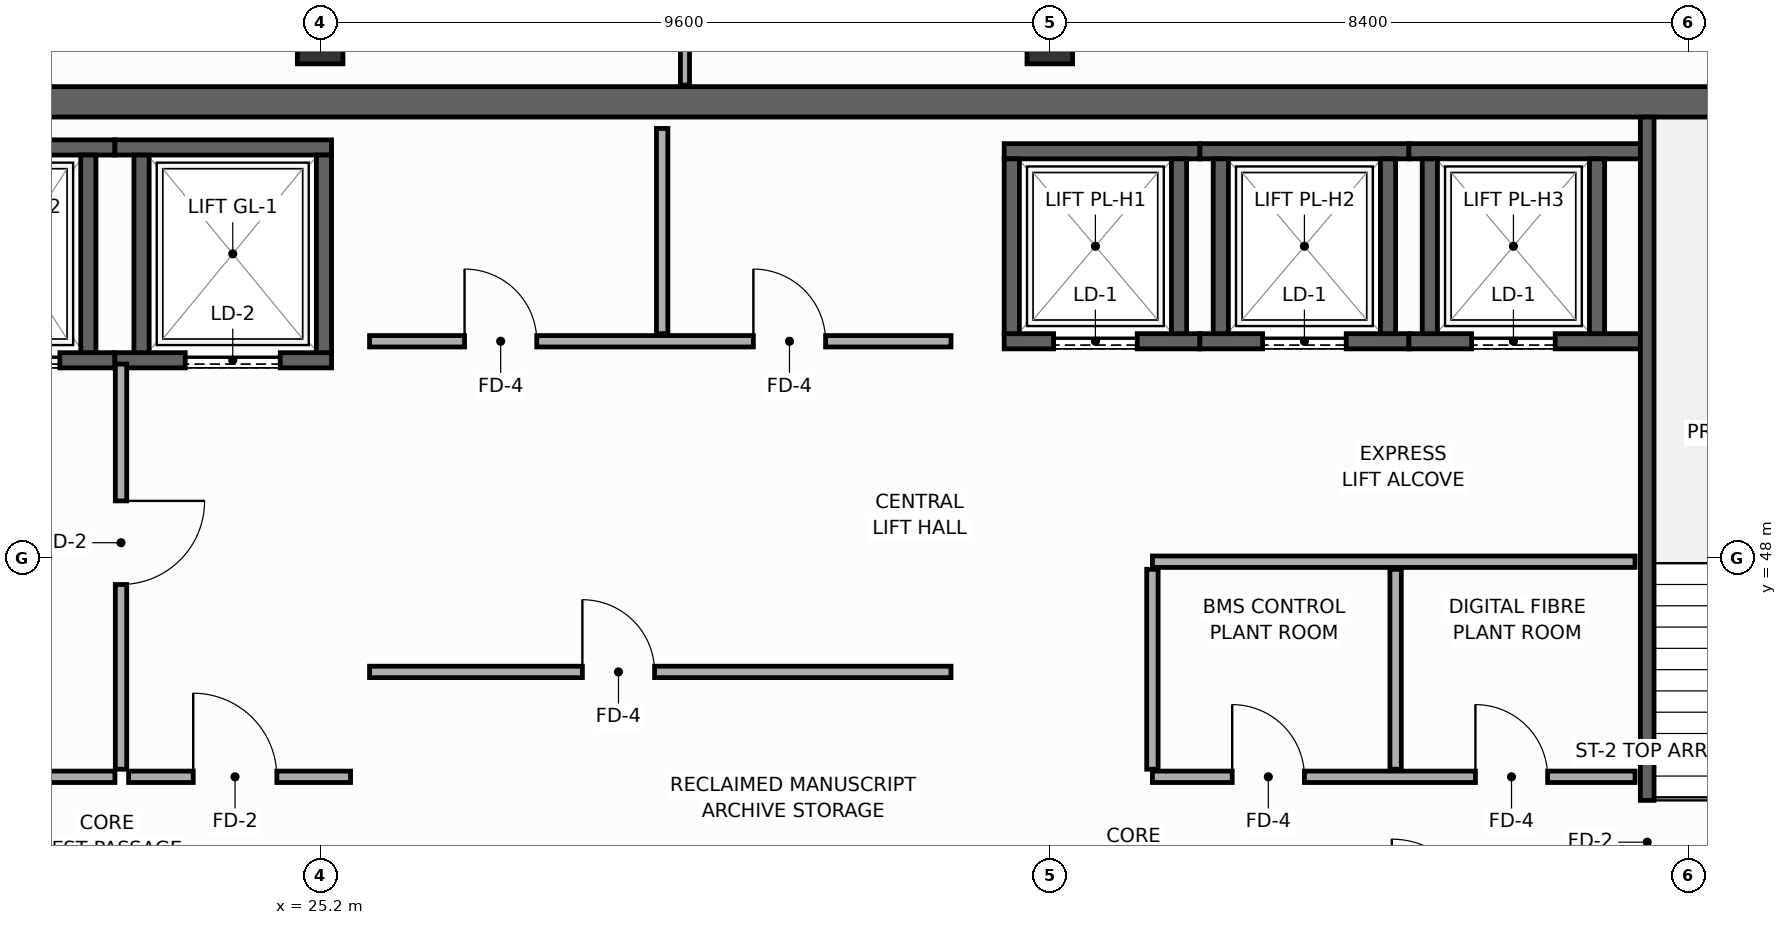
"""IFC4 building model, lengths in metres.
Left out: names, types, materials, properties, quantities, classifications, styles, units other than length and angle.
Written with IfcOpenShell. Run it as: python <this file> out.ifc"""

import sys

from ifc_helpers import new_model, si_unit, direction, frame, frame_2d, origin, origin_2d, place, context, subcontext, project, spatial, rectangle, hollow_rectangle, extrude, element, fill, save


model = new_model("IFC4")
c1 = context("Model", 3, precision=1e-05, world=origin(), true_north=direction((0.0, 1.0)))
c2 = subcontext(c1, "Body", "Model", "MODEL_VIEW")
j1 = project(units=[si_unit("LENGTHUNIT", "METRE"), si_unit("PLANEANGLEUNIT", "RADIAN")], contexts=[c1])
p1 = place(None, origin())
s1 = spatial("IfcSite", under=j1, at=p1, CompositionType="ELEMENT")
p2 = place(p1, origin())
s2 = spatial("IfcBuilding", under=s1, at=p2, CompositionType="ELEMENT")
p3 = place(p2, frame((0.0, 0.0, 323.4)))
s3 = spatial("IfcBuildingStorey", under=s2, at=p3, CompositionType="ELEMENT", Elevation=323.4)
p4 = place(p3, frame((13.7, 54.0, 0.0), z_axis=(0.0, 0.0, 1.0), x_axis=(1.0, 0.0, 0.0)))
e1 = element("IfcWall", 1, at=p4, inside=s3, PredefinedType="SHEAR", context=c2, shape_type="SweptSolid", body=[
    extrude(rectangle(XDim=32.5, YDim=0.4, at=frame_2d((16.25, 0.0))), origin(), (0.0, 0.0, 1.0), 3.9),
])
for number, where, z_axis, x_axis in (
    (2, (25.2, 54.8, 0.0), (0.0, 0.0, 1.0), (1.0, 0.0, 0.0)),
    (3, (34.8, 54.8, 0.0), (0.0, 0.0, 1.0), (1.0, 0.0, 0.0)),
):
    element("IfcColumn", number, at=place(p3, frame(where, z_axis=z_axis, x_axis=x_axis)), inside=s3, PredefinedType="COLUMN", context=c2, shape_type="SweptSolid", body=[
        extrude(hollow_rectangle(XDim=0.6, YDim=0.6, WallThickness=0.028, at=origin_2d()), origin(), (0.0, 0.0, 1.0), 4.2),
    ])
p5 = place(p3, frame((19.85, 50.6, 0.0), z_axis=(0.0, 0.0, 1.0), x_axis=(1.0, 0.0, 0.0)))
e4 = element("IfcWall", 4, at=p5, inside=s3, PredefinedType="SHEAR", context=c2, shape_type="SweptSolid", body=[
    extrude(rectangle(XDim=2.65, YDim=0.2, at=frame_2d((1.325, 0.0))), origin(), (0.0, 0.0, 1.0), 3.68),
])
p6 = place(p5, frame((0.675, 0.0, 0.0)))
e5 = element("IfcOpeningElement", 5, at=p6, cuts=e4, PredefinedType="OPENING", context=c2, shape_type="SweptSolid", body=[
    extrude(rectangle(XDim=1.25, YDim=2.3, at=frame_2d((0.625, 1.15))), frame((0.0, 0.11, 0.0), z_axis=(0.0, -1.0, 0.0), x_axis=(1.0, 0.0, 0.0)), (0.0, 0.0, 1.0), 0.22),
])
p7 = place(p3, frame((19.85, 53.4, 0.0), z_axis=(0.0, 0.0, 1.0), x_axis=(1.0, 0.0, 0.0)))
e6 = element("IfcWall", 6, at=p7, inside=s3, PredefinedType="SHEAR", context=c2, shape_type="SweptSolid", body=[
    extrude(rectangle(XDim=2.65, YDim=0.2, at=frame_2d((1.325, 0.0))), origin(), (0.0, 0.0, 1.0), 3.68),
])
p8 = place(p3, frame((22.15, 50.7, 0.0), z_axis=(0.0, 0.0, 1.0), x_axis=(0.0, 1.0, 0.0)))
e7 = element("IfcWall", 7, at=p8, inside=s3, PredefinedType="SHEAR", context=c2, shape_type="SweptSolid", body=[
    extrude(rectangle(XDim=2.6, YDim=0.2, at=frame_2d((1.3, 0.0))), origin(), (0.0, 0.0, 1.0), 3.68),
])
p9 = place(p3, frame((22.5, 50.6, 0.0), z_axis=(0.0, 0.0, 1.0), x_axis=(1.0, 0.0, 0.0)))
e8 = element("IfcWall", 8, at=p9, inside=s3, PredefinedType="SHEAR", context=c2, shape_type="SweptSolid", body=[
    extrude(rectangle(XDim=2.85, YDim=0.2, at=frame_2d((1.425, 0.0))), origin(), (0.0, 0.0, 1.0), 3.68),
])
p10 = place(p9, frame((0.925, 0.0, 0.0)))
e9 = element("IfcOpeningElement", 9, at=p10, cuts=e8, PredefinedType="OPENING", context=c2, shape_type="SweptSolid", body=[
    extrude(rectangle(XDim=1.25, YDim=2.3, at=frame_2d((0.625, 1.15))), frame((0.0, 0.11, 0.0), z_axis=(0.0, -1.0, 0.0), x_axis=(1.0, 0.0, 0.0)), (0.0, 0.0, 1.0), 0.22),
])
p11 = place(p3, frame((22.5, 53.4, 0.0), z_axis=(0.0, 0.0, 1.0), x_axis=(1.0, 0.0, 0.0)))
e10 = element("IfcWall", 10, at=p11, inside=s3, PredefinedType="SHEAR", context=c2, shape_type="SweptSolid", body=[
    extrude(rectangle(XDim=2.85, YDim=0.2, at=frame_2d((1.425, 0.0))), origin(), (0.0, 0.0, 1.0), 3.68),
])
for number, where, z_axis, x_axis in (
    (11, (22.85, 50.7, 0.0), (0.0, 0.0, 1.0), (0.0, 1.0, 0.0)),
    (12, (25.25, 50.7, 0.0), (0.0, 0.0, 1.0), (0.0, 1.0, 0.0)),
):
    element("IfcWall", number, at=place(p3, frame(where, z_axis=z_axis, x_axis=x_axis)), inside=s3, PredefinedType="SHEAR", context=c2, shape_type="SweptSolid", body=[
        extrude(rectangle(XDim=2.6, YDim=0.2, at=frame_2d((1.3, 0.0))), origin(), (0.0, 0.0, 1.0), 3.68),
    ])
p12 = place(p3, frame((34.2, 50.85, 0.0), z_axis=(0.0, 0.0, 1.0), x_axis=(1.0, 0.0, 0.0)))
e13 = element("IfcWall", 13, at=p12, inside=s3, PredefinedType="SHEAR", context=c2, shape_type="SweptSolid", body=[
    extrude(rectangle(XDim=2.575, YDim=0.2, at=frame_2d((1.288, 0.0))), origin(), (0.0, 0.0, 1.0), 3.68),
])
p13 = place(p12, frame((0.65, 0.0, 0.0)))
e14 = element("IfcOpeningElement", 14, at=p13, cuts=e13, PredefinedType="OPENING", context=c2, shape_type="SweptSolid", body=[
    extrude(rectangle(XDim=1.1, YDim=2.2, at=frame_2d((0.55, 1.1))), frame((0.0, 0.11, 0.0), z_axis=(0.0, -1.0, 0.0), x_axis=(1.0, 0.0, 0.0)), (0.0, 0.0, 1.0), 0.22),
])
p14 = place(p3, frame((34.2, 53.35, 0.0), z_axis=(0.0, 0.0, 1.0), x_axis=(1.0, 0.0, 0.0)))
e15 = element("IfcWall", 15, at=p14, inside=s3, PredefinedType="SHEAR", context=c2, shape_type="SweptSolid", body=[
    extrude(rectangle(XDim=2.575, YDim=0.2, at=frame_2d((1.288, 0.0))), origin(), (0.0, 0.0, 1.0), 3.68),
])
for number, where, z_axis, x_axis in (
    (16, (34.3, 50.95, 0.0), (0.0, 0.0, 1.0), (0.0, 1.0, 0.0)),
    (17, (36.5, 50.95, 0.0), (0.0, 0.0, 1.0), (0.0, 1.0, 0.0)),
):
    element("IfcWall", number, at=place(p3, frame(where, z_axis=z_axis, x_axis=x_axis)), inside=s3, PredefinedType="SHEAR", context=c2, shape_type="SweptSolid", body=[
        extrude(rectangle(XDim=2.3, YDim=0.2, at=frame_2d((1.15, 0.0))), origin(), (0.0, 0.0, 1.0), 3.68),
    ])
p15 = place(p3, frame((36.775, 50.85, 0.0), z_axis=(0.0, 0.0, 1.0), x_axis=(1.0, 0.0, 0.0)))
e18 = element("IfcWall", 18, at=p15, inside=s3, PredefinedType="SHEAR", context=c2, shape_type="SweptSolid", body=[
    extrude(rectangle(XDim=2.75, YDim=0.2, at=frame_2d((1.375, 0.0))), origin(), (0.0, 0.0, 1.0), 3.68),
])
p16 = place(p15, frame((0.825, 0.0, 0.0)))
e19 = element("IfcOpeningElement", 19, at=p16, cuts=e18, PredefinedType="OPENING", context=c2, shape_type="SweptSolid", body=[
    extrude(rectangle(XDim=1.1, YDim=2.2, at=frame_2d((0.55, 1.1))), frame((0.0, 0.11, 0.0), z_axis=(0.0, -1.0, 0.0), x_axis=(1.0, 0.0, 0.0)), (0.0, 0.0, 1.0), 0.22),
])
p17 = place(p3, frame((36.775, 53.35, 0.0), z_axis=(0.0, 0.0, 1.0), x_axis=(1.0, 0.0, 0.0)))
e20 = element("IfcWall", 20, at=p17, inside=s3, PredefinedType="SHEAR", context=c2, shape_type="SweptSolid", body=[
    extrude(rectangle(XDim=2.75, YDim=0.2, at=frame_2d((1.375, 0.0))), origin(), (0.0, 0.0, 1.0), 3.68),
])
for number, where, z_axis, x_axis in (
    (21, (37.05, 50.95, 0.0), (0.0, 0.0, 1.0), (0.0, 1.0, 0.0)),
    (22, (39.25, 50.95, 0.0), (0.0, 0.0, 1.0), (0.0, 1.0, 0.0)),
):
    element("IfcWall", number, at=place(p3, frame(where, z_axis=z_axis, x_axis=x_axis)), inside=s3, PredefinedType="SHEAR", context=c2, shape_type="SweptSolid", body=[
        extrude(rectangle(XDim=2.3, YDim=0.2, at=frame_2d((1.15, 0.0))), origin(), (0.0, 0.0, 1.0), 3.68),
    ])
p18 = place(p3, frame((39.525, 50.85, 0.0), z_axis=(0.0, 0.0, 1.0), x_axis=(1.0, 0.0, 0.0)))
e23 = element("IfcWall", 23, at=p18, inside=s3, PredefinedType="SHEAR", context=c2, shape_type="SweptSolid", body=[
    extrude(rectangle(XDim=3.045, YDim=0.2, at=frame_2d((1.522, 0.0))), origin(), (0.0, 0.0, 1.0), 3.68),
])
p19 = place(p18, frame((0.825, 0.0, 0.0)))
e24 = element("IfcOpeningElement", 24, at=p19, cuts=e23, PredefinedType="OPENING", context=c2, shape_type="SweptSolid", body=[
    extrude(rectangle(XDim=1.1, YDim=2.2, at=frame_2d((0.55, 1.1))), frame((0.0, 0.11, 0.0), z_axis=(0.0, -1.0, 0.0), x_axis=(1.0, 0.0, 0.0)), (0.0, 0.0, 1.0), 0.22),
])
p20 = place(p3, frame((39.525, 53.35, 0.0), z_axis=(0.0, 0.0, 1.0), x_axis=(1.0, 0.0, 0.0)))
e25 = element("IfcWall", 25, at=p20, inside=s3, PredefinedType="SHEAR", context=c2, shape_type="SweptSolid", body=[
    extrude(rectangle(XDim=3.045, YDim=0.2, at=frame_2d((1.522, 0.0))), origin(), (0.0, 0.0, 1.0), 3.68),
])
for number, where, z_axis, x_axis in (
    (26, (39.8, 50.95, 0.0), (0.0, 0.0, 1.0), (0.0, 1.0, 0.0)),
    (27, (42.0, 50.95, 0.0), (0.0, 0.0, 1.0), (0.0, 1.0, 0.0)),
):
    element("IfcWall", number, at=place(p3, frame(where, z_axis=z_axis, x_axis=x_axis)), inside=s3, PredefinedType="SHEAR", context=c2, shape_type="SweptSolid", body=[
        extrude(rectangle(XDim=2.3, YDim=0.2, at=frame_2d((1.15, 0.0))), origin(), (0.0, 0.0, 1.0), 3.68),
    ])
p21 = place(p3, frame((42.66, 53.8, 0.0), z_axis=(0.0, 0.0, 1.0), x_axis=(0.0, -1.0, 0.0)))
e28 = element("IfcWall", 28, at=p21, inside=s3, PredefinedType="SHEAR", context=c2, shape_type="SweptSolid", body=[
    extrude(rectangle(XDim=10.4, YDim=0.18, at=frame_2d((5.2, 0.0))), origin(), (0.0, 0.0, 1.0), 3.9),
])
p22 = place(p21, frame((8.99, 0.0, 0.0)))
e29 = element("IfcOpeningElement", 29, at=p22, cuts=e28, PredefinedType="OPENING", context=c2, shape_type="SweptSolid", body=[
    extrude(rectangle(XDim=1.1, YDim=2.15, at=frame_2d((0.55, 1.075))), frame((0.0, 0.1, 0.0), z_axis=(0.0, -1.0, 0.0), x_axis=(1.0, 0.0, 0.0)), (0.0, 0.0, 1.0), 0.2),
])
p23 = place(p3, frame((17.36, 45.12, 0.0), z_axis=(0.0, 0.0, 1.0), x_axis=(1.0, 0.0, 0.0)))
e30 = element("IfcWall", 30, at=p23, inside=s3, PredefinedType="PARTITIONING", context=c2, shape_type="SweptSolid", body=[
    extrude(rectangle(XDim=5.14, YDim=0.15, at=frame_2d((2.57, 0.0))), origin(), (0.0, 0.0, 1.0), 3.9),
])
p24 = place(p23, frame((1.8, 0.0, 0.0)))
e31 = element("IfcOpeningElement", 31, at=p24, cuts=e30, PredefinedType="OPENING", context=c2, shape_type="SweptSolid", body=[
    extrude(rectangle(XDim=1.1, YDim=2.15, at=frame_2d((0.55, 1.075))), frame((0.0, 0.085, 0.0), z_axis=(0.0, -1.0, 0.0), x_axis=(1.0, 0.0, 0.0)), (0.0, 0.0, 1.0), 0.17),
])
p25 = place(p3, frame((22.58, 50.55, 0.0), z_axis=(0.0, 0.0, 1.0), x_axis=(0.0, -1.0, 0.0)))
e32 = element("IfcWall", 32, at=p25, inside=s3, PredefinedType="PARTITIONING", context=c2, shape_type="SweptSolid", body=[
    extrude(rectangle(XDim=5.33, YDim=0.15, at=frame_2d((2.665, 0.0))), origin(), (0.0, 0.0, 1.0), 3.9),
])
p26 = place(p25, frame((1.8, 0.0, 0.0)))
e33 = element("IfcOpeningElement", 33, at=p26, cuts=e32, PredefinedType="OPENING", context=c2, shape_type="SweptSolid", body=[
    extrude(rectangle(XDim=1.1, YDim=2.15, at=frame_2d((0.55, 1.075))), frame((0.0, 0.085, 0.0), z_axis=(0.0, -1.0, 0.0), x_axis=(1.0, 0.0, 0.0)), (0.0, 0.0, 1.0), 0.17),
])
p27 = place(p3, frame((22.68, 45.12, 0.0), z_axis=(0.0, 0.0, 1.0), x_axis=(1.0, 0.0, 0.0)))
e34 = element("IfcWall", 34, at=p27, inside=s3, PredefinedType="PARTITIONING", context=c2, shape_type="SweptSolid", body=[
    extrude(rectangle(XDim=2.92, YDim=0.15, at=frame_2d((1.46, 0.0))), origin(), (0.0, 0.0, 1.0), 3.9),
])
p28 = place(p27, frame((0.85, 0.0, 0.0)))
e35 = element("IfcOpeningElement", 35, at=p28, cuts=e34, PredefinedType="OPENING", context=c2, shape_type="SweptSolid", body=[
    extrude(rectangle(XDim=1.1, YDim=2.15, at=frame_2d((0.55, 1.075))), frame((0.0, 0.085, 0.0), z_axis=(0.0, -1.0, 0.0), x_axis=(1.0, 0.0, 0.0)), (0.0, 0.0, 1.0), 0.17),
])
p29 = place(p3, frame((36.15, 45.12, 0.0), z_axis=(0.0, 0.0, 1.0), x_axis=(1.0, 0.0, 0.0)))
e36 = element("IfcWall", 36, at=p29, inside=s3, PredefinedType="PARTITIONING", context=c2, shape_type="SweptSolid", body=[
    extrude(rectangle(XDim=6.35, YDim=0.15, at=frame_2d((3.175, 0.0))), origin(), (0.0, 0.0, 1.0), 3.9),
])
p30 = place(p29, frame((1.05, 0.0, 0.0)))
e37 = element("IfcOpeningElement", 37, at=p30, cuts=e36, PredefinedType="OPENING", context=c2, shape_type="SweptSolid", body=[
    extrude(rectangle(XDim=0.95, YDim=2.15, at=frame_2d((0.475, 1.075))), frame((0.0, 0.085, 0.0), z_axis=(0.0, -1.0, 0.0), x_axis=(1.0, 0.0, 0.0)), (0.0, 0.0, 1.0), 0.17),
])
p31 = place(p29, frame((4.25, 0.0, 0.0)))
e38 = element("IfcOpeningElement", 38, at=p31, cuts=e36, PredefinedType="OPENING", context=c2, shape_type="SweptSolid", body=[
    extrude(rectangle(XDim=0.95, YDim=2.15, at=frame_2d((0.475, 1.075))), frame((0.0, 0.085, 0.0), z_axis=(0.0, -1.0, 0.0), x_axis=(1.0, 0.0, 0.0)), (0.0, 0.0, 1.0), 0.17),
])
p32 = place(p3, frame((36.15, 47.95, 0.0), z_axis=(0.0, 0.0, 1.0), x_axis=(1.0, 0.0, 0.0)))
e39 = element("IfcWall", 39, at=p32, inside=s3, PredefinedType="PARTITIONING", context=c2, shape_type="SweptSolid", body=[
    extrude(rectangle(XDim=6.35, YDim=0.15, at=frame_2d((3.175, 0.0))), origin(), (0.0, 0.0, 1.0), 3.9),
])
for number, where, z_axis, x_axis in (
    (40, (36.15, 45.22, 0.0), (0.0, 0.0, 1.0), (0.0, 1.0, 0.0)),
    (41, (39.35, 45.22, 0.0), (0.0, 0.0, 1.0), (0.0, 1.0, 0.0)),
):
    element("IfcWall", number, at=place(p3, frame(where, z_axis=z_axis, x_axis=x_axis)), inside=s3, PredefinedType="PARTITIONING", context=c2, shape_type="SweptSolid", body=[
        extrude(rectangle(XDim=2.63, YDim=0.15, at=frame_2d((1.315, 0.0))), origin(), (0.0, 0.0, 1.0), 3.9),
    ])
p33 = place(p3, frame((25.85, 50.85, 0.0), z_axis=(0.0, 0.0, 1.0), x_axis=(1.0, 0.0, 0.0)))
e42 = element("IfcWall", 42, at=p33, inside=s3, PredefinedType="PARTITIONING", context=c2, shape_type="SweptSolid", body=[
    extrude(rectangle(XDim=7.65, YDim=0.15, at=frame_2d((3.825, 0.0))), origin(), (0.0, 0.0, 1.0), 3.9),
])
p34 = place(p33, frame((1.25, 0.0, 0.0)))
e43 = element("IfcOpeningElement", 43, at=p34, cuts=e42, PredefinedType="OPENING", context=c2, shape_type="SweptSolid", body=[
    extrude(rectangle(XDim=0.95, YDim=2.15, at=frame_2d((0.475, 1.075))), frame((0.0, 0.085, 0.0), z_axis=(0.0, -1.0, 0.0), x_axis=(1.0, 0.0, 0.0)), (0.0, 0.0, 1.0), 0.17),
])
p35 = place(p33, frame((5.05, 0.0, 0.0)))
e44 = element("IfcOpeningElement", 44, at=p35, cuts=e42, PredefinedType="OPENING", context=c2, shape_type="SweptSolid", body=[
    extrude(rectangle(XDim=0.95, YDim=2.15, at=frame_2d((0.475, 1.075))), frame((0.0, 0.085, 0.0), z_axis=(0.0, -1.0, 0.0), x_axis=(1.0, 0.0, 0.0)), (0.0, 0.0, 1.0), 0.17),
])
p36 = place(p3, frame((29.7, 50.95, 0.0), z_axis=(0.0, 0.0, 1.0), x_axis=(0.0, 1.0, 0.0)))
e45 = element("IfcWall", 45, at=p36, inside=s3, PredefinedType="PARTITIONING", context=c2, shape_type="SweptSolid", body=[
    extrude(rectangle(XDim=2.7, YDim=0.15, at=frame_2d((1.35, 0.0))), origin(), (0.0, 0.0, 1.0), 3.9),
])
p37 = place(p3, frame((25.85, 46.5, 0.0), z_axis=(0.0, 0.0, 1.0), x_axis=(1.0, 0.0, 0.0)))
e46 = element("IfcWall", 46, at=p37, inside=s3, PredefinedType="PARTITIONING", context=c2, shape_type="SweptSolid", body=[
    extrude(rectangle(XDim=7.65, YDim=0.15, at=frame_2d((3.825, 0.0))), origin(), (0.0, 0.0, 1.0), 3.9),
])
p38 = place(p37, frame((2.8, 0.0, 0.0)))
e47 = element("IfcOpeningElement", 47, at=p38, cuts=e46, PredefinedType="OPENING", context=c2, shape_type="SweptSolid", body=[
    extrude(rectangle(XDim=0.95, YDim=2.15, at=frame_2d((0.475, 1.075))), frame((0.0, 0.085, 0.0), z_axis=(0.0, -1.0, 0.0), x_axis=(1.0, 0.0, 0.0)), (0.0, 0.0, 1.0), 0.17),
])
p39 = place(p3, frame((30.0, 54.22, 0.0), z_axis=(0.0, 0.0, 1.0), x_axis=(0.0, 1.0, 0.0)))
e48 = element("IfcWall", 48, at=p39, inside=s3, PredefinedType="PARTITIONING", context=c2, shape_type="SweptSolid", body=[
    extrude(rectangle(XDim=1.775, YDim=0.12, at=frame_2d((0.888, 0.0))), origin(), (0.0, 0.0, 1.0), 3.285),
])
p40 = place(p6, origin())
e49 = element("IfcDoor", 49, at=p40, inside=s3, OperationType="SLIDING_TO_LEFT", PredefinedType="DOOR", context=c2, shape_type="SweptSolid", body=[
    extrude(rectangle(XDim=1.25, YDim=2.3, at=frame_2d((0.625, 1.15))), frame((0.0, 0.025, 0.0), z_axis=(0.0, -1.0, 0.0), x_axis=(1.0, 0.0, 0.0)), (0.0, 0.0, 1.0), 0.05),
])
fill(e5, e49)
p41 = place(p10, origin())
e50 = element("IfcDoor", 50, at=p41, inside=s3, OperationType="SLIDING_TO_LEFT", PredefinedType="DOOR", context=c2, shape_type="SweptSolid", body=[
    extrude(rectangle(XDim=1.25, YDim=2.3, at=frame_2d((0.625, 1.15))), frame((0.0, 0.025, 0.0), z_axis=(0.0, -1.0, 0.0), x_axis=(1.0, 0.0, 0.0)), (0.0, 0.0, 1.0), 0.05),
])
fill(e9, e50)
p42 = place(p13, origin())
e51 = element("IfcDoor", 51, at=p42, inside=s3, OperationType="SLIDING_TO_LEFT", PredefinedType="DOOR", context=c2, shape_type="SweptSolid", body=[
    extrude(rectangle(XDim=1.1, YDim=2.2, at=frame_2d((0.55, 1.1))), frame((0.0, 0.025, 0.0), z_axis=(0.0, -1.0, 0.0), x_axis=(1.0, 0.0, 0.0)), (0.0, 0.0, 1.0), 0.05),
])
fill(e14, e51)
p43 = place(p16, origin())
e52 = element("IfcDoor", 52, at=p43, inside=s3, OperationType="SLIDING_TO_LEFT", PredefinedType="DOOR", context=c2, shape_type="SweptSolid", body=[
    extrude(rectangle(XDim=1.1, YDim=2.2, at=frame_2d((0.55, 1.1))), frame((0.0, 0.025, 0.0), z_axis=(0.0, -1.0, 0.0), x_axis=(1.0, 0.0, 0.0)), (0.0, 0.0, 1.0), 0.05),
])
fill(e19, e52)
p44 = place(p19, origin())
e53 = element("IfcDoor", 53, at=p44, inside=s3, OperationType="SLIDING_TO_LEFT", PredefinedType="DOOR", context=c2, shape_type="SweptSolid", body=[
    extrude(rectangle(XDim=1.1, YDim=2.2, at=frame_2d((0.55, 1.1))), frame((0.0, 0.025, 0.0), z_axis=(0.0, -1.0, 0.0), x_axis=(1.0, 0.0, 0.0)), (0.0, 0.0, 1.0), 0.05),
])
fill(e24, e53)
p45 = place(p22, origin())
e54 = element("IfcDoor", 54, at=p45, inside=s3, OperationType="SINGLE_SWING_LEFT", PredefinedType="DOOR", context=c2, shape_type="SweptSolid", body=[
    extrude(rectangle(XDim=1.1, YDim=2.15, at=frame_2d((0.55, 1.075))), frame((0.0, 0.025, 0.0), z_axis=(0.0, -1.0, 0.0), x_axis=(1.0, 0.0, 0.0)), (0.0, 0.0, 1.0), 0.05),
])
fill(e29, e54)
p46 = place(p26, origin())
e55 = element("IfcDoor", 55, at=p46, inside=s3, OperationType="SINGLE_SWING_LEFT", PredefinedType="DOOR", context=c2, shape_type="SweptSolid", body=[
    extrude(rectangle(XDim=1.1, YDim=2.15, at=frame_2d((0.55, 1.075))), frame((0.0, 0.025, 0.0), z_axis=(0.0, -1.0, 0.0), x_axis=(1.0, 0.0, 0.0)), (0.0, 0.0, 1.0), 0.05),
])
fill(e33, e55)
p47 = place(p28, origin())
e56 = element("IfcDoor", 56, at=p47, inside=s3, OperationType="SINGLE_SWING_LEFT", PredefinedType="DOOR", context=c2, shape_type="SweptSolid", body=[
    extrude(rectangle(XDim=1.1, YDim=2.15, at=frame_2d((0.55, 1.075))), frame((0.0, 0.025, 0.0), z_axis=(0.0, -1.0, 0.0), x_axis=(1.0, 0.0, 0.0)), (0.0, 0.0, 1.0), 0.05),
])
fill(e35, e56)
p48 = place(p30, origin())
e57 = element("IfcDoor", 57, at=p48, inside=s3, OperationType="SINGLE_SWING_LEFT", PredefinedType="DOOR", context=c2, shape_type="SweptSolid", body=[
    extrude(rectangle(XDim=0.95, YDim=2.15, at=frame_2d((0.475, 1.075))), frame((0.0, 0.025, 0.0), z_axis=(0.0, -1.0, 0.0), x_axis=(1.0, 0.0, 0.0)), (0.0, 0.0, 1.0), 0.05),
])
fill(e37, e57)
p49 = place(p31, origin())
e58 = element("IfcDoor", 58, at=p49, inside=s3, OperationType="SINGLE_SWING_LEFT", PredefinedType="DOOR", context=c2, shape_type="SweptSolid", body=[
    extrude(rectangle(XDim=0.95, YDim=2.15, at=frame_2d((0.475, 1.075))), frame((0.0, 0.025, 0.0), z_axis=(0.0, -1.0, 0.0), x_axis=(1.0, 0.0, 0.0)), (0.0, 0.0, 1.0), 0.05),
])
fill(e38, e58)
p50 = place(p34, origin())
e59 = element("IfcDoor", 59, at=p50, inside=s3, OperationType="SINGLE_SWING_LEFT", PredefinedType="DOOR", context=c2, shape_type="SweptSolid", body=[
    extrude(rectangle(XDim=0.95, YDim=2.15, at=frame_2d((0.475, 1.075))), frame((0.0, 0.025, 0.0), z_axis=(0.0, -1.0, 0.0), x_axis=(1.0, 0.0, 0.0)), (0.0, 0.0, 1.0), 0.05),
])
fill(e43, e59)
p51 = place(p35, origin())
e60 = element("IfcDoor", 60, at=p51, inside=s3, OperationType="SINGLE_SWING_LEFT", PredefinedType="DOOR", context=c2, shape_type="SweptSolid", body=[
    extrude(rectangle(XDim=0.95, YDim=2.15, at=frame_2d((0.475, 1.075))), frame((0.0, 0.025, 0.0), z_axis=(0.0, -1.0, 0.0), x_axis=(1.0, 0.0, 0.0)), (0.0, 0.0, 1.0), 0.05),
])
fill(e44, e60)
p52 = place(p38, origin())
e61 = element("IfcDoor", 61, at=p52, inside=s3, OperationType="SINGLE_SWING_LEFT", PredefinedType="DOOR", context=c2, shape_type="SweptSolid", body=[
    extrude(rectangle(XDim=0.95, YDim=2.15, at=frame_2d((0.475, 1.075))), frame((0.0, 0.025, 0.0), z_axis=(0.0, -1.0, 0.0), x_axis=(1.0, 0.0, 0.0)), (0.0, 0.0, 1.0), 0.05),
])
fill(e47, e61)
save(model, sys.argv[1])
